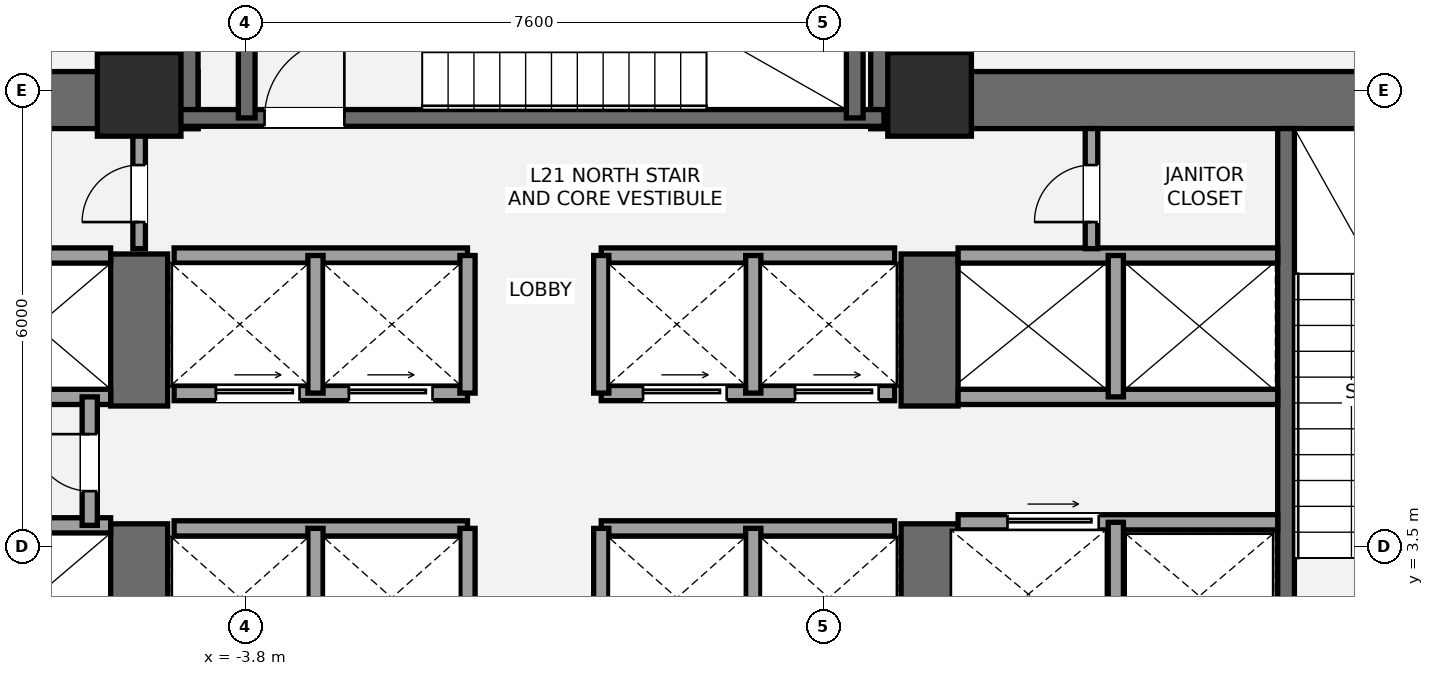
"""IFC4 building model, lengths in metres.
Left out: names, types, materials, properties, quantities, classifications, styles, units other than length and angle.
Written with IfcOpenShell. Run it as: python <this file> out.ifc"""

import sys

from ifc_helpers import new_model, si_unit, direction, frame, frame_2d, origin, origin_2d, place, context, subcontext, project, spatial, rectangle, extrude, element, fill, save


model = new_model("IFC4")
c1 = context("Model", 3, precision=1e-05, world=origin(), true_north=direction((0.0, 1.0)))
c2 = subcontext(c1, "Body", "Model", "MODEL_VIEW")
j1 = project(units=[si_unit("LENGTHUNIT", "METRE"), si_unit("PLANEANGLEUNIT", "RADIAN")], contexts=[c1])
p1 = place(None, origin())
s1 = spatial("IfcSite", under=j1, at=p1, CompositionType="ELEMENT")
p2 = place(p1, origin())
s2 = spatial("IfcBuilding", under=s1, at=p2, CompositionType="ELEMENT")
p3 = place(p2, frame((0.0, 0.0, 81.9)))
s3 = spatial("IfcBuildingStorey", under=s2, at=p3, CompositionType="ELEMENT", Elevation=81.9)
p4 = place(p3, frame((-13.9, 9.375, 0.0), z_axis=(0.0, 0.0, 1.0), x_axis=(1.0, 0.0, 0.0)))
e1 = element("IfcWall", 1, at=p4, inside=s3, PredefinedType="SHEAR", context=c2, shape_type="SweptSolid", body=[
    extrude(rectangle(XDim=9.475, YDim=0.75, at=frame_2d((4.737, 0.0))), origin(), (0.0, 0.0, 1.0), 4.2),
])
p5 = place(p3, frame((-5.2, 1.1, 0.0), z_axis=(0.0, 0.0, 1.0), x_axis=(0.0, 1.0, 0.0)))
e2 = element("IfcWall", 2, at=p5, inside=s3, PredefinedType="SHEAR", context=c2, shape_type="SweptSolid", body=[
    extrude(rectangle(XDim=2.7, YDim=0.75, at=frame_2d((1.35, 0.0))), origin(), (0.0, 0.0, 1.0), 4.2),
])
p6 = place(p3, frame((-5.2, 5.35, 0.0), z_axis=(0.0, 0.0, 1.0), x_axis=(0.0, 1.0, 0.0)))
e3 = element("IfcWall", 3, at=p6, inside=s3, PredefinedType="SHEAR", context=c2, shape_type="SweptSolid", body=[
    extrude(rectangle(XDim=2.0, YDim=0.75, at=frame_2d((1.0, 0.0))), origin(), (0.0, 0.0, 1.0), 4.2),
])
p7 = place(p3, frame((4.425, 9.375, 0.0), z_axis=(0.0, 0.0, 1.0), x_axis=(1.0, 0.0, 0.0)))
e4 = element("IfcWall", 4, at=p7, inside=s3, PredefinedType="SHEAR", context=c2, shape_type="SweptSolid", body=[
    extrude(rectangle(XDim=9.475, YDim=0.75, at=frame_2d((4.737, 0.0))), origin(), (0.0, 0.0, 1.0), 4.2),
])
p8 = place(p3, frame((5.2, 1.1, 0.0), z_axis=(0.0, 0.0, 1.0), x_axis=(0.0, 1.0, 0.0)))
e5 = element("IfcWall", 5, at=p8, inside=s3, PredefinedType="SHEAR", context=c2, shape_type="SweptSolid", body=[
    extrude(rectangle(XDim=2.7, YDim=0.75, at=frame_2d((1.35, 0.0))), origin(), (0.0, 0.0, 1.0), 4.2),
])
p9 = place(p3, frame((5.2, 5.35, 0.0), z_axis=(0.0, 0.0, 1.0), x_axis=(0.0, 1.0, 0.0)))
e6 = element("IfcWall", 6, at=p9, inside=s3, PredefinedType="SHEAR", context=c2, shape_type="SweptSolid", body=[
    extrude(rectangle(XDim=2.0, YDim=0.75, at=frame_2d((1.0, 0.0))), origin(), (0.0, 0.0, 1.0), 4.2),
])
p10 = place(p3, frame((9.89, 1.85, 0.0), z_axis=(0.0, 0.0, 1.0), x_axis=(0.0, 1.0, 0.0)))
e7 = element("IfcWall", 7, at=p10, inside=s3, PredefinedType="SHEAR", context=c2, shape_type="SweptSolid", body=[
    extrude(rectangle(XDim=7.15, YDim=0.22, at=frame_2d((3.575, 0.0))), origin(), (0.0, 0.0, 1.0), 4.2),
])
for number, where, z_axis, x_axis in (
    (8, (-4.8, 9.0, 0.0), (0.0, 0.0, 1.0), (0.0, 1.0, 0.0)),
    (9, (4.8, 9.0, 0.0), (0.0, 0.0, 1.0), (0.0, 1.0, 0.0)),
):
    element("IfcWall", number, at=place(p3, frame(where, z_axis=z_axis, x_axis=x_axis)), inside=s3, PredefinedType="SHEAR", context=c2, shape_type="SweptSolid", body=[
        extrude(rectangle(XDim=4.15, YDim=0.75, at=frame_2d((2.075, 0.0))), origin(), (0.0, 0.0, 1.0), 4.2),
    ])
p11 = place(p3, frame((-4.7, 9.14, 0.0), z_axis=(0.0, 0.0, 1.0), x_axis=(1.0, 0.0, 0.0)))
e10 = element("IfcWall", 10, at=p11, inside=s3, PredefinedType="SHEAR", context=c2, shape_type="SweptSolid", body=[
    extrude(rectangle(XDim=9.3, YDim=0.22, at=frame_2d((4.65, 0.0))), origin(), (0.0, 0.0, 1.0), 4.2),
])
p12 = place(p11, frame((1.15, 0.0, 0.0)))
e11 = element("IfcOpeningElement", 11, at=p12, cuts=e10, PredefinedType="OPENING", context=c2, shape_type="SweptSolid", body=[
    extrude(rectangle(XDim=1.05, YDim=2.15, at=frame_2d((0.525, 1.075))), frame((0.0, 0.12, 0.0), z_axis=(0.0, -1.0, 0.0), x_axis=(1.0, 0.0, 0.0)), (0.0, 0.0, 1.0), 0.24),
])
for number, where, z_axis, x_axis in (
    (12, (-3.785, 9.14, 0.0), (0.0, 0.0, 1.0), (0.0, 1.0, 0.0)),
    (13, (4.215, 9.14, 0.0), (0.0, 0.0, 1.0), (0.0, 1.0, 0.0)),
):
    element("IfcWall", number, at=place(p3, frame(where, z_axis=z_axis, x_axis=x_axis)), inside=s3, PredefinedType="SHEAR", context=c2, shape_type="SweptSolid", body=[
        extrude(rectangle(XDim=3.26, YDim=0.22, at=frame_2d((1.63, 0.0))), origin(), (0.0, 0.0, 1.0), 4.2),
    ])
for number, where, z_axis, x_axis in (
    (14, (-5.2, 9.45, 0.0), (0.0, 0.0, 1.0), (1.0, 0.0, 0.0)),
    (15, (5.2, 9.45, 0.0), (0.0, 0.0, 1.0), (1.0, 0.0, 0.0)),
):
    element("IfcColumn", number, at=place(p3, frame(where, z_axis=z_axis, x_axis=x_axis)), inside=s3, PredefinedType="COLUMN", context=c2, shape_type="SweptSolid", body=[
        extrude(rectangle(XDim=1.1, YDim=1.1, at=origin_2d()), origin(), (0.0, 0.0, 1.0), 4.2),
    ])
for number, where, z_axis, x_axis in (
    (16, (-9.78, 3.78, 0.0), (0.0, 0.0, 1.0), (1.0, 0.0, 0.0)),
    (17, (-9.78, 5.47, 0.0), (0.0, 0.0, 1.0), (1.0, 0.0, 0.0)),
    (18, (-9.78, 7.33, 0.0), (0.0, 0.0, 1.0), (1.0, 0.0, 0.0)),
):
    element("IfcWall", number, at=place(p3, frame(where, z_axis=z_axis, x_axis=x_axis)), inside=s3, PredefinedType="SOLIDWALL", context=c2, shape_type="SweptSolid", body=[
        extrude(rectangle(XDim=4.205, YDim=0.2, at=frame_2d((2.103, 0.0))), origin(), (0.0, 0.0, 1.0), 4.01),
    ])
p13 = place(p3, frame((-5.85, 3.78, 0.0), z_axis=(0.0, 0.0, 1.0), x_axis=(0.0, 1.0, 0.0)))
e19 = element("IfcWall", 19, at=p13, inside=s3, PredefinedType="SOLIDWALL", context=c2, shape_type="SweptSolid", body=[
    extrude(rectangle(XDim=1.69, YDim=0.2, at=frame_2d((0.845, 0.0))), origin(), (0.0, 0.0, 1.0), 4.01),
])
p14 = place(p13, frame((0.45, 0.0, 0.0)))
e20 = element("IfcOpeningElement", 20, at=p14, cuts=e19, PredefinedType="OPENING", context=c2, shape_type="SweptSolid", body=[
    extrude(rectangle(XDim=0.75, YDim=2.1, at=frame_2d((0.375, 1.05))), frame((0.0, 0.11, 0.0), z_axis=(0.0, -1.0, 0.0), x_axis=(1.0, 0.0, 0.0)), (0.0, 0.0, 1.0), 0.22),
])
p15 = place(p3, frame((5.575, 3.82, 0.0), z_axis=(0.0, 0.0, 1.0), x_axis=(1.0, 0.0, 0.0)))
e21 = element("IfcWall", 21, at=p15, inside=s3, PredefinedType="SOLIDWALL", context=c2, shape_type="SweptSolid", body=[
    extrude(rectangle(XDim=4.205, YDim=0.2, at=frame_2d((2.103, 0.0))), origin(), (0.0, 0.0, 1.0), 4.01),
])
p16 = place(p15, frame((0.65, 0.0, 0.0)))
e22 = element("IfcOpeningElement", 22, at=p16, cuts=e21, PredefinedType="OPENING", context=c2, shape_type="SweptSolid", body=[
    extrude(rectangle(XDim=1.2, YDim=2.2, at=frame_2d((0.6, 1.1))), frame((0.0, 0.11, 0.0), z_axis=(0.0, -1.0, 0.0), x_axis=(1.0, 0.0, 0.0)), (0.0, 0.0, 1.0), 0.22),
])
p17 = place(p3, frame((7.65, 1.85, 0.0), z_axis=(0.0, 0.0, 1.0), x_axis=(0.0, 1.0, 0.0)))
e23 = element("IfcWall", 23, at=p17, inside=s3, PredefinedType="SOLIDWALL", context=c2, shape_type="SweptSolid", body=[
    extrude(rectangle(XDim=1.97, YDim=0.2, at=frame_2d((0.985, 0.0))), origin(), (0.0, 0.0, 1.0), 4.01),
])
for number, where, z_axis, x_axis in (
    (24, (5.575, 5.47, 0.0), (0.0, 0.0, 1.0), (1.0, 0.0, 0.0)),
    (25, (5.575, 7.33, 0.0), (0.0, 0.0, 1.0), (1.0, 0.0, 0.0)),
):
    element("IfcWall", number, at=place(p3, frame(where, z_axis=z_axis, x_axis=x_axis)), inside=s3, PredefinedType="SOLIDWALL", context=c2, shape_type="SweptSolid", body=[
        extrude(rectangle(XDim=4.205, YDim=0.2, at=frame_2d((2.103, 0.0))), origin(), (0.0, 0.0, 1.0), 4.01),
    ])
p18 = place(p3, frame((7.65, 5.47, 0.0), z_axis=(0.0, 0.0, 1.0), x_axis=(0.0, 1.0, 0.0)))
e26 = element("IfcWall", 26, at=p18, inside=s3, PredefinedType="SOLIDWALL", context=c2, shape_type="SweptSolid", body=[
    extrude(rectangle(XDim=1.86, YDim=0.2, at=frame_2d((0.93, 0.0))), origin(), (0.0, 0.0, 1.0), 4.01),
])
for number, where, z_axis, x_axis in (
    (27, (-4.74, 3.74, 0.0), (0.0, 0.0, 1.0), (1.0, 0.0, 0.0)),
    (28, (0.88, 3.74, 0.0), (0.0, 0.0, 1.0), (1.0, 0.0, 0.0)),
):
    element("IfcWall", number, at=place(p3, frame(where, z_axis=z_axis, x_axis=x_axis)), inside=s3, PredefinedType="SOLIDWALL", context=c2, shape_type="SweptSolid", body=[
        extrude(rectangle(XDim=3.86, YDim=0.2, at=frame_2d((1.93, 0.0))), origin(), (0.0, 0.0, 1.0), 4.01),
    ])
for number, where, z_axis, x_axis in (
    (29, (-2.88, 1.92, 0.0), (0.0, 0.0, 1.0), (0.0, 1.0, 0.0)),
    (30, (2.88, 1.92, 0.0), (0.0, 0.0, 1.0), (0.0, 1.0, 0.0)),
    (31, (-0.88, 1.92, 0.0), (0.0, 0.0, 1.0), (0.0, 1.0, 0.0)),
    (32, (0.88, 1.92, 0.0), (0.0, 0.0, 1.0), (0.0, 1.0, 0.0)),
):
    element("IfcWall", number, at=place(p3, frame(where, z_axis=z_axis, x_axis=x_axis)), inside=s3, PredefinedType="SOLIDWALL", context=c2, shape_type="SweptSolid", body=[
        extrude(rectangle(XDim=1.82, YDim=0.2, at=frame_2d((0.91, 0.0))), origin(), (0.0, 0.0, 1.0), 4.01),
    ])
p19 = place(p3, frame((-4.74, 5.52, 0.0), z_axis=(0.0, 0.0, 1.0), x_axis=(1.0, 0.0, 0.0)))
e33 = element("IfcWall", 33, at=p19, inside=s3, PredefinedType="SOLIDWALL", context=c2, shape_type="SweptSolid", body=[
    extrude(rectangle(XDim=3.86, YDim=0.2, at=frame_2d((1.93, 0.0))), origin(), (0.0, 0.0, 1.0), 4.01),
])
p20 = place(p19, frame((0.55, 0.0, 0.0)))
e34 = element("IfcOpeningElement", 34, at=p20, cuts=e33, PredefinedType="OPENING", context=c2, shape_type="SweptSolid", body=[
    extrude(rectangle(XDim=1.1, YDim=2.2, at=frame_2d((0.55, 1.1))), frame((0.0, 0.11, 0.0), z_axis=(0.0, -1.0, 0.0), x_axis=(1.0, 0.0, 0.0)), (0.0, 0.0, 1.0), 0.22),
])
p21 = place(p19, frame((2.3, 0.0, 0.0)))
e35 = element("IfcOpeningElement", 35, at=p21, cuts=e33, PredefinedType="OPENING", context=c2, shape_type="SweptSolid", body=[
    extrude(rectangle(XDim=1.1, YDim=2.2, at=frame_2d((0.55, 1.1))), frame((0.0, 0.11, 0.0), z_axis=(0.0, -1.0, 0.0), x_axis=(1.0, 0.0, 0.0)), (0.0, 0.0, 1.0), 0.22),
])
p22 = place(p3, frame((0.88, 5.52, 0.0), z_axis=(0.0, 0.0, 1.0), x_axis=(1.0, 0.0, 0.0)))
e36 = element("IfcWall", 36, at=p22, inside=s3, PredefinedType="SOLIDWALL", context=c2, shape_type="SweptSolid", body=[
    extrude(rectangle(XDim=3.86, YDim=0.2, at=frame_2d((1.93, 0.0))), origin(), (0.0, 0.0, 1.0), 4.01),
])
p23 = place(p22, frame((0.55, 0.0, 0.0)))
e37 = element("IfcOpeningElement", 37, at=p23, cuts=e36, PredefinedType="OPENING", context=c2, shape_type="SweptSolid", body=[
    extrude(rectangle(XDim=1.1, YDim=2.2, at=frame_2d((0.55, 1.1))), frame((0.0, 0.11, 0.0), z_axis=(0.0, -1.0, 0.0), x_axis=(1.0, 0.0, 0.0)), (0.0, 0.0, 1.0), 0.22),
])
p24 = place(p22, frame((2.55, 0.0, 0.0)))
e38 = element("IfcOpeningElement", 38, at=p24, cuts=e36, PredefinedType="OPENING", context=c2, shape_type="SweptSolid", body=[
    extrude(rectangle(XDim=1.1, YDim=2.2, at=frame_2d((0.55, 1.1))), frame((0.0, 0.11, 0.0), z_axis=(0.0, -1.0, 0.0), x_axis=(1.0, 0.0, 0.0)), (0.0, 0.0, 1.0), 0.22),
])
for number, where, z_axis, x_axis in (
    (39, (-4.74, 7.33, 0.0), (0.0, 0.0, 1.0), (1.0, 0.0, 0.0)),
    (40, (0.88, 7.33, 0.0), (0.0, 0.0, 1.0), (1.0, 0.0, 0.0)),
):
    element("IfcWall", number, at=place(p3, frame(where, z_axis=z_axis, x_axis=x_axis)), inside=s3, PredefinedType="SOLIDWALL", context=c2, shape_type="SweptSolid", body=[
        extrude(rectangle(XDim=3.86, YDim=0.2, at=frame_2d((1.93, 0.0))), origin(), (0.0, 0.0, 1.0), 4.01),
    ])
for number, where, z_axis, x_axis in (
    (41, (-2.88, 5.52, 0.0), (0.0, 0.0, 1.0), (0.0, 1.0, 0.0)),
    (42, (2.88, 5.52, 0.0), (0.0, 0.0, 1.0), (0.0, 1.0, 0.0)),
    (43, (-0.88, 5.52, 0.0), (0.0, 0.0, 1.0), (0.0, 1.0, 0.0)),
    (44, (0.88, 5.52, 0.0), (0.0, 0.0, 1.0), (0.0, 1.0, 0.0)),
):
    element("IfcWall", number, at=place(p3, frame(where, z_axis=z_axis, x_axis=x_axis)), inside=s3, PredefinedType="SOLIDWALL", context=c2, shape_type="SweptSolid", body=[
        extrude(rectangle(XDim=1.81, YDim=0.2, at=frame_2d((0.905, 0.0))), origin(), (0.0, 0.0, 1.0), 4.01),
    ])
p25 = place(p3, frame((-5.2, 7.42, 0.0), z_axis=(0.0, 0.0, 1.0), x_axis=(0.0, 1.0, 0.0)))
e45 = element("IfcWall", 45, at=p25, inside=s3, PredefinedType="PARTITIONING", context=c2, shape_type="SweptSolid", body=[
    extrude(rectangle(XDim=1.58, YDim=0.165, at=frame_2d((0.79, 0.0))), origin(), (0.0, 0.0, 1.0), 4.01),
])
p26 = place(p25, frame((0.35, 0.0, 0.0)))
e46 = element("IfcOpeningElement", 46, at=p26, cuts=e45, PredefinedType="OPENING", context=c2, shape_type="SweptSolid", body=[
    extrude(rectangle(XDim=0.75, YDim=2.1, at=frame_2d((0.375, 1.05))), frame((0.0, 0.093, 0.0), z_axis=(0.0, -1.0, 0.0), x_axis=(1.0, 0.0, 0.0)), (0.0, 0.0, 1.0), 0.185),
])
p27 = place(p3, frame((7.33, 7.42, 0.0), z_axis=(0.0, 0.0, 1.0), x_axis=(0.0, 1.0, 0.0)))
e47 = element("IfcWall", 47, at=p27, inside=s3, PredefinedType="PARTITIONING", context=c2, shape_type="SweptSolid", body=[
    extrude(rectangle(XDim=1.58, YDim=0.165, at=frame_2d((0.79, 0.0))), origin(), (0.0, 0.0, 1.0), 4.01),
])
p28 = place(p27, frame((0.35, 0.0, 0.0)))
e48 = element("IfcOpeningElement", 48, at=p28, cuts=e47, PredefinedType="OPENING", context=c2, shape_type="SweptSolid", body=[
    extrude(rectangle(XDim=0.75, YDim=2.1, at=frame_2d((0.375, 1.05))), frame((0.0, 0.093, 0.0), z_axis=(0.0, -1.0, 0.0), x_axis=(1.0, 0.0, 0.0)), (0.0, 0.0, 1.0), 0.185),
])
p29 = place(p12, origin())
e49 = element("IfcDoor", 49, at=p29, inside=s3, OperationType="SINGLE_SWING_RIGHT", PredefinedType="DOOR", context=c2, shape_type="SweptSolid", body=[
    extrude(rectangle(XDim=1.05, YDim=2.15, at=frame_2d((0.525, 1.075))), frame((0.0, 0.025, 0.0), z_axis=(0.0, -1.0, 0.0), x_axis=(1.0, 0.0, 0.0)), (0.0, 0.0, 1.0), 0.05),
])
fill(e11, e49)
p30 = place(p14, origin())
e50 = element("IfcDoor", 50, at=p30, inside=s3, OperationType="SINGLE_SWING_RIGHT", PredefinedType="DOOR", context=c2, shape_type="SweptSolid", body=[
    extrude(rectangle(XDim=0.75, YDim=2.1, at=frame_2d((0.375, 1.05))), frame((0.0, 0.025, 0.0), z_axis=(0.0, -1.0, 0.0), x_axis=(1.0, 0.0, 0.0)), (0.0, 0.0, 1.0), 0.05),
])
fill(e20, e50)
p31 = place(p16, origin())
e51 = element("IfcDoor", 51, at=p31, inside=s3, OperationType="SLIDING_TO_RIGHT", PredefinedType="DOOR", context=c2, shape_type="SweptSolid", body=[
    extrude(rectangle(XDim=1.2, YDim=2.2, at=frame_2d((0.6, 1.1))), frame((0.0, 0.025, 0.0), z_axis=(0.0, -1.0, 0.0), x_axis=(1.0, 0.0, 0.0)), (0.0, 0.0, 1.0), 0.05),
])
fill(e22, e51)
p32 = place(p20, origin())
e52 = element("IfcDoor", 52, at=p32, inside=s3, OperationType="SLIDING_TO_LEFT", PredefinedType="DOOR", context=c2, shape_type="SweptSolid", body=[
    extrude(rectangle(XDim=1.1, YDim=2.2, at=frame_2d((0.55, 1.1))), frame((0.0, 0.025, 0.0), z_axis=(0.0, -1.0, 0.0), x_axis=(1.0, 0.0, 0.0)), (0.0, 0.0, 1.0), 0.05),
])
fill(e34, e52)
p33 = place(p21, origin())
e53 = element("IfcDoor", 53, at=p33, inside=s3, OperationType="SLIDING_TO_LEFT", PredefinedType="DOOR", context=c2, shape_type="SweptSolid", body=[
    extrude(rectangle(XDim=1.1, YDim=2.2, at=frame_2d((0.55, 1.1))), frame((0.0, 0.025, 0.0), z_axis=(0.0, -1.0, 0.0), x_axis=(1.0, 0.0, 0.0)), (0.0, 0.0, 1.0), 0.05),
])
fill(e35, e53)
p34 = place(p23, origin())
e54 = element("IfcDoor", 54, at=p34, inside=s3, OperationType="SLIDING_TO_LEFT", PredefinedType="DOOR", context=c2, shape_type="SweptSolid", body=[
    extrude(rectangle(XDim=1.1, YDim=2.2, at=frame_2d((0.55, 1.1))), frame((0.0, 0.025, 0.0), z_axis=(0.0, -1.0, 0.0), x_axis=(1.0, 0.0, 0.0)), (0.0, 0.0, 1.0), 0.05),
])
fill(e37, e54)
p35 = place(p24, origin())
e55 = element("IfcDoor", 55, at=p35, inside=s3, OperationType="SLIDING_TO_LEFT", PredefinedType="DOOR", context=c2, shape_type="SweptSolid", body=[
    extrude(rectangle(XDim=1.1, YDim=2.2, at=frame_2d((0.55, 1.1))), frame((0.0, 0.025, 0.0), z_axis=(0.0, -1.0, 0.0), x_axis=(1.0, 0.0, 0.0)), (0.0, 0.0, 1.0), 0.05),
])
fill(e38, e55)
p36 = place(p26, origin())
e56 = element("IfcDoor", 56, at=p36, inside=s3, OperationType="SINGLE_SWING_LEFT", PredefinedType="DOOR", context=c2, shape_type="SweptSolid", body=[
    extrude(rectangle(XDim=0.75, YDim=2.1, at=frame_2d((0.375, 1.05))), frame((0.0, 0.025, 0.0), z_axis=(0.0, -1.0, 0.0), x_axis=(1.0, 0.0, 0.0)), (0.0, 0.0, 1.0), 0.05),
])
fill(e46, e56)
p37 = place(p28, origin())
e57 = element("IfcDoor", 57, at=p37, inside=s3, OperationType="SINGLE_SWING_LEFT", PredefinedType="DOOR", context=c2, shape_type="SweptSolid", body=[
    extrude(rectangle(XDim=0.75, YDim=2.1, at=frame_2d((0.375, 1.05))), frame((0.0, 0.025, 0.0), z_axis=(0.0, -1.0, 0.0), x_axis=(1.0, 0.0, 0.0)), (0.0, 0.0, 1.0), 0.05),
])
fill(e48, e57)
save(model, sys.argv[1])
